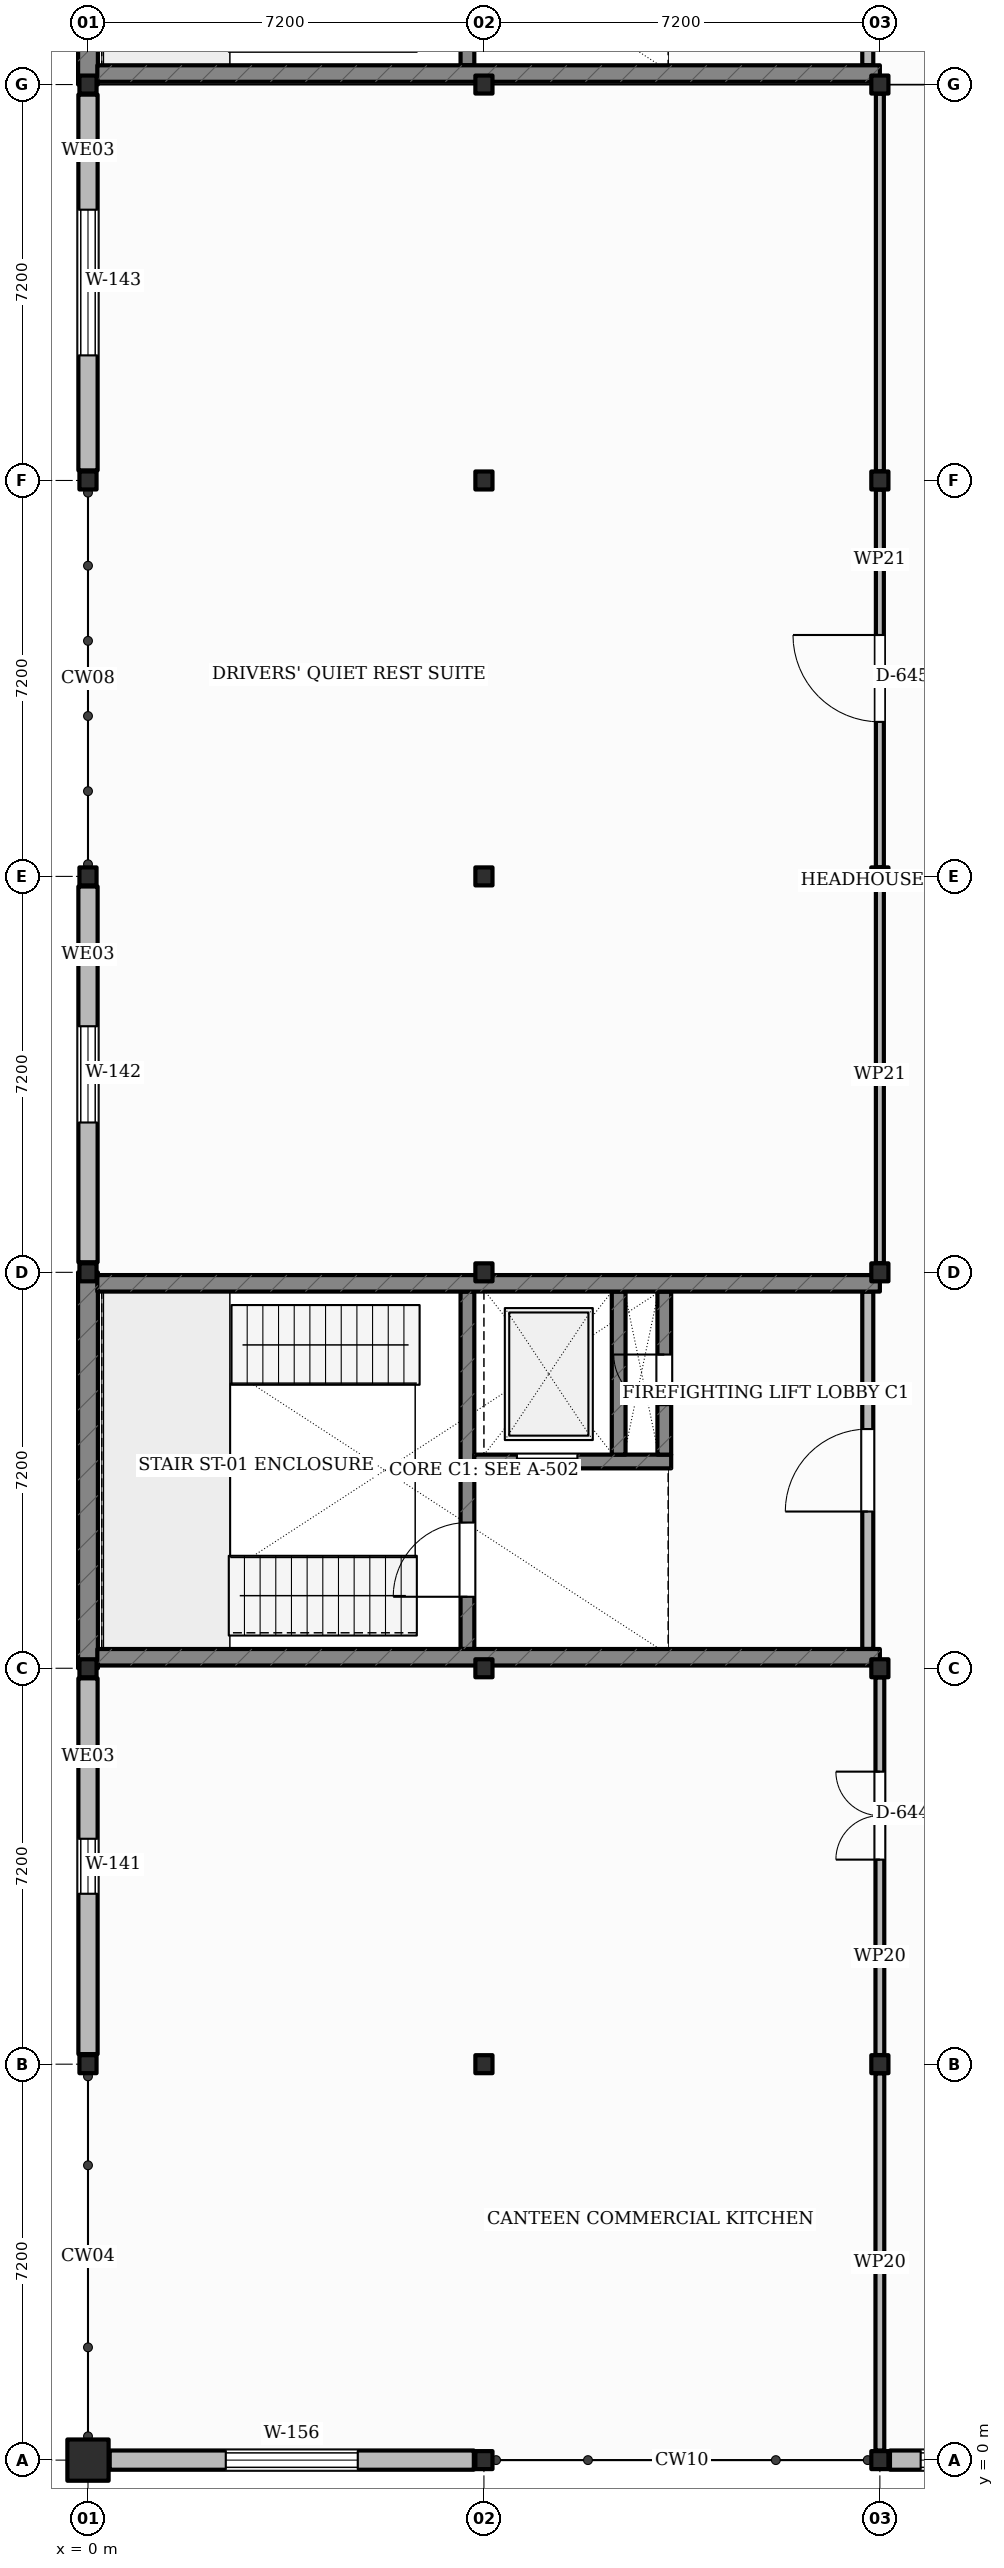
"""IFC4 building model, lengths in metres.
Left out: names, types, materials, properties, quantities, classifications, styles, units other than length and angle.
Written with IfcOpenShell. Run it as: python <this file> out.ifc"""

import sys

from ifc_helpers import new_model, si_unit, direction, frame, frame_2d, origin, origin_with_axes, origin_2d, place, context, subcontext, project, spatial, rectangle, i_section, extrude, element, fill, save


model = new_model("IFC4")
c1 = context("Model", 3, precision=1e-05, world=origin(), true_north=direction((0.0, 1.0)))
c2 = subcontext(c1, "Body", "Model", "MODEL_VIEW")
j1 = project(units=[si_unit("LENGTHUNIT", "METRE"), si_unit("PLANEANGLEUNIT", "RADIAN")], contexts=[c1])
p1 = place(None, origin())
s1 = spatial("IfcSite", under=j1, at=p1, CompositionType="ELEMENT")
p2 = place(p1, origin())
s2 = spatial("IfcBuilding", under=s1, at=p2, CompositionType="ELEMENT")
p3 = place(p2, frame((0.0, 0.0, 5.4)))
s3 = spatial("IfcBuildingStorey", under=s2, at=p3, CompositionType="ELEMENT", Elevation=5.4)
p4 = place(p3, origin_with_axes())
e1 = element("IfcColumn", 1, at=p4, inside=s3, PredefinedType="COLUMN", context=c2, shape_type="SweptSolid", body=[
    extrude(rectangle(XDim=0.75, YDim=0.75, at=origin_2d()), origin(), (0.0, 0.0, 1.0), 4.5),
])
for number, where, z_axis, x_axis in (
    (2, (0.0, 7.2, 0.0), (0.0, 0.0, 1.0), (1.0, 0.0, 0.0)),
    (3, (0.0, 14.4, 0.0), (0.0, 0.0, 1.0), (1.0, 0.0, 0.0)),
    (4, (0.0, 21.6, 0.0), (0.0, 0.0, 1.0), (1.0, 0.0, 0.0)),
    (5, (0.0, 28.8, 0.0), (0.0, 0.0, 1.0), (1.0, 0.0, 0.0)),
    (6, (0.0, 36.0, 0.0), (0.0, 0.0, 1.0), (1.0, 0.0, 0.0)),
    (7, (0.0, 43.2, 0.0), (0.0, 0.0, 1.0), (1.0, 0.0, 0.0)),
    (8, (7.2, 0.0, 0.0), (0.0, 0.0, 1.0), (1.0, 0.0, 0.0)),
    (9, (7.2, 7.2, 0.0), (0.0, 0.0, 1.0), (1.0, 0.0, 0.0)),
    (10, (7.2, 14.4, 0.0), (0.0, 0.0, 1.0), (1.0, 0.0, 0.0)),
    (11, (7.2, 21.6, 0.0), (0.0, 0.0, 1.0), (1.0, 0.0, 0.0)),
    (12, (7.2, 28.8, 0.0), (0.0, 0.0, 1.0), (1.0, 0.0, 0.0)),
    (13, (7.2, 36.0, 0.0), (0.0, 0.0, 1.0), (1.0, 0.0, 0.0)),
    (14, (7.2, 43.2, 0.0), (0.0, 0.0, 1.0), (1.0, 0.0, 0.0)),
    (15, (14.4, 0.0, 0.0), (0.0, 0.0, 1.0), (1.0, 0.0, 0.0)),
    (16, (14.4, 7.2, 0.0), (0.0, 0.0, 1.0), (1.0, 0.0, 0.0)),
    (17, (14.4, 14.4, 0.0), (0.0, 0.0, 1.0), (1.0, 0.0, 0.0)),
    (18, (14.4, 21.6, 0.0), (0.0, 0.0, 1.0), (1.0, 0.0, 0.0)),
    (19, (14.4, 28.8, 0.0), (0.0, 0.0, 1.0), (1.0, 0.0, 0.0)),
    (20, (14.4, 36.0, 0.0), (0.0, 0.0, 1.0), (1.0, 0.0, 0.0)),
    (21, (14.4, 43.2, 0.0), (0.0, 0.0, 1.0), (1.0, 0.0, 0.0)),
):
    element("IfcColumn", number, at=place(p3, frame(where, z_axis=z_axis, x_axis=x_axis)), inside=s3, PredefinedType="COLUMN", context=c2, shape_type="SweptSolid", body=[
        extrude(i_section(OverallWidth=0.311, OverallDepth=0.327, WebThickness=0.016, FlangeThickness=0.025, FilletRadius=0.015, at=origin_2d()), origin(), (0.0, 0.0, 1.0), 4.5),
    ])
p5 = place(p3, frame((0.0, 7.384, 0.0), z_axis=(0.0, 0.0, 1.0), x_axis=(0.0, 1.0, 0.0)))
e22 = element("IfcWall", 22, at=p5, inside=s3, PredefinedType="SOLIDWALL", context=c2, shape_type="SweptSolid", body=[
    extrude(rectangle(XDim=6.833, YDim=0.35, at=frame_2d((3.417, 0.0))), origin(), (0.0, 0.0, 1.0), 3.704),
])
p6 = place(p5, frame((2.916, 0.0, 1.05)))
e23 = element("IfcOpeningElement", 23, at=p6, cuts=e22, PredefinedType="OPENING", context=c2, shape_type="SweptSolid", body=[
    extrude(rectangle(XDim=1.0, YDim=1.6, at=frame_2d((0.5, 0.8))), frame((0.0, 0.185, 0.0), z_axis=(0.0, -1.0, 0.0), x_axis=(1.0, 0.0, 0.0)), (0.0, 0.0, 1.0), 0.37),
])
p7 = place(p3, frame((0.0, 14.4, 0.0), z_axis=(0.0, 0.0, 1.0), x_axis=(0.0, 1.0, 0.0)))
e24 = element("IfcWall", 24, at=p7, inside=s3, PredefinedType="SHEAR", context=c2, shape_type="SweptSolid", body=[
    extrude(rectangle(XDim=7.2, YDim=0.36, at=frame_2d((3.6, 0.0))), origin(), (0.0, 0.0, 1.0), 3.704),
])
p8 = place(p3, frame((0.0, 21.784, 0.0), z_axis=(0.0, 0.0, 1.0), x_axis=(0.0, 1.0, 0.0)))
e25 = element("IfcWall", 25, at=p8, inside=s3, PredefinedType="SOLIDWALL", context=c2, shape_type="SweptSolid", body=[
    extrude(rectangle(XDim=6.833, YDim=0.35, at=frame_2d((3.417, 0.0))), origin(), (0.0, 0.0, 1.0), 3.704),
])
p9 = place(p8, frame((2.541, 0.0, 1.05)))
e26 = element("IfcOpeningElement", 26, at=p9, cuts=e25, PredefinedType="OPENING", context=c2, shape_type="SweptSolid", body=[
    extrude(rectangle(XDim=1.75, YDim=1.85, at=frame_2d((0.875, 0.925))), frame((0.0, 0.185, 0.0), z_axis=(0.0, -1.0, 0.0), x_axis=(1.0, 0.0, 0.0)), (0.0, 0.0, 1.0), 0.37),
])
p10 = place(p3, frame((0.0, 36.184, 0.0), z_axis=(0.0, 0.0, 1.0), x_axis=(0.0, 1.0, 0.0)))
e27 = element("IfcWall", 27, at=p10, inside=s3, PredefinedType="SOLIDWALL", context=c2, shape_type="SweptSolid", body=[
    extrude(rectangle(XDim=6.833, YDim=0.35, at=frame_2d((3.417, 0.0))), origin(), (0.0, 0.0, 1.0), 3.704),
])
p11 = place(p10, frame((2.091, 0.0, 1.05)))
e28 = element("IfcOpeningElement", 28, at=p11, cuts=e27, PredefinedType="OPENING", context=c2, shape_type="SweptSolid", body=[
    extrude(rectangle(XDim=2.65, YDim=1.6, at=frame_2d((1.325, 0.8))), frame((0.0, 0.185, 0.0), z_axis=(0.0, -1.0, 0.0), x_axis=(1.0, 0.0, 0.0)), (0.0, 0.0, 1.0), 0.37),
])
p12 = place(p3, frame((0.0, 43.2, 0.0), z_axis=(0.0, 0.0, 1.0), x_axis=(0.0, 1.0, 0.0)))
e29 = element("IfcWall", 29, at=p12, inside=s3, PredefinedType="SHEAR", context=c2, shape_type="SweptSolid", body=[
    extrude(rectangle(XDim=7.2, YDim=0.36, at=frame_2d((3.6, 0.0))), origin(), (0.0, 0.0, 1.0), 3.704),
])
p13 = place(p3, frame((21.417, 0.0, 0.0), z_axis=(0.0, 0.0, 1.0), x_axis=(-1.0, 0.0, 0.0)))
e30 = element("IfcWall", 30, at=p13, inside=s3, PredefinedType="SOLIDWALL", context=c2, shape_type="SweptSolid", body=[
    extrude(rectangle(XDim=6.833, YDim=0.35, at=frame_2d((3.417, 0.0))), origin(), (0.0, 0.0, 1.0), 3.75),
])
p14 = place(p13, frame((3.625, 0.0, 1.05)))
e31 = element("IfcOpeningElement", 31, at=p14, cuts=e30, PredefinedType="OPENING", context=c2, shape_type="SweptSolid", body=[
    extrude(rectangle(XDim=2.65, YDim=1.6, at=frame_2d((1.325, 0.8))), frame((0.0, 0.185, 0.0), z_axis=(0.0, -1.0, 0.0), x_axis=(1.0, 0.0, 0.0)), (0.0, 0.0, 1.0), 0.37),
])
p15 = place(p3, frame((7.016, 0.0, 0.0), z_axis=(0.0, 0.0, 1.0), x_axis=(-1.0, 0.0, 0.0)))
e32 = element("IfcWall", 32, at=p15, inside=s3, PredefinedType="SOLIDWALL", context=c2, shape_type="SweptSolid", body=[
    extrude(rectangle(XDim=6.621, YDim=0.35, at=frame_2d((3.311, 0.0))), origin(), (0.0, 0.0, 1.0), 3.39),
])
p16 = place(p15, frame((2.111, 0.0, 1.05)))
e33 = element("IfcOpeningElement", 33, at=p16, cuts=e32, PredefinedType="OPENING", context=c2, shape_type="SweptSolid", body=[
    extrude(rectangle(XDim=2.4, YDim=1.8, at=frame_2d((1.2, 0.9))), frame((0.0, 0.185, 0.0), z_axis=(0.0, -1.0, 0.0), x_axis=(1.0, 0.0, 0.0)), (0.0, 0.0, 1.0), 0.37),
])
p17 = place(p3, frame((6.9, 14.75, 0.0), z_axis=(0.0, 0.0, 1.0), x_axis=(0.0, 1.0, 0.0)))
e34 = element("IfcWall", 34, at=p17, inside=s3, PredefinedType="SHEAR", context=c2, shape_type="SweptSolid", body=[
    extrude(rectangle(XDim=6.5, YDim=0.25, at=frame_2d((3.25, 0.0))), origin(), (0.0, 0.0, 1.0), 3.55),
])
p18 = place(p17, frame((0.95, 0.0, 0.0)))
e35 = element("IfcOpeningElement", 35, at=p18, cuts=e34, PredefinedType="OPENING", context=c2, shape_type="SweptSolid", body=[
    extrude(rectangle(XDim=1.35, YDim=2.15, at=frame_2d((0.675, 1.075))), frame((0.0, 0.135, 0.0), z_axis=(0.0, -1.0, 0.0), x_axis=(1.0, 0.0, 0.0)), (0.0, 0.0, 1.0), 0.27),
])
p19 = place(p3, frame((7.025, 18.16, 0.0), z_axis=(0.0, 0.0, 1.0), x_axis=(1.0, 0.0, 0.0)))
e36 = element("IfcWall", 36, at=p19, inside=s3, PredefinedType="SHEAR", context=c2, shape_type="SweptSolid", body=[
    extrude(rectangle(XDim=3.58, YDim=0.25, at=frame_2d((1.79, 0.0))), origin(), (0.0, 0.0, 1.0), 3.55),
])
p20 = place(p19, frame((0.775, 0.0, 0.0)))
e37 = element("IfcOpeningElement", 37, at=p20, cuts=e36, PredefinedType="OPENING", context=c2, shape_type="SweptSolid", body=[
    extrude(rectangle(XDim=1.1, YDim=2.15, at=frame_2d((0.55, 1.075))), frame((0.0, 0.135, 0.0), z_axis=(0.0, -1.0, 0.0), x_axis=(1.0, 0.0, 0.0)), (0.0, 0.0, 1.0), 0.27),
])
p21 = place(p3, frame((9.65, 18.285, 0.0), z_axis=(0.0, 0.0, 1.0), x_axis=(0.0, 1.0, 0.0)))
e38 = element("IfcWall", 38, at=p21, inside=s3, PredefinedType="SHEAR", context=c2, shape_type="SweptSolid", body=[
    extrude(rectangle(XDim=2.965, YDim=0.25, at=frame_2d((1.482, 0.0))), origin(), (0.0, 0.0, 1.0), 3.55),
])
p22 = place(p3, frame((10.48, 18.285, 0.0), z_axis=(0.0, 0.0, 1.0), x_axis=(0.0, 1.0, 0.0)))
e39 = element("IfcWall", 39, at=p22, inside=s3, PredefinedType="SHEAR", context=c2, shape_type="SweptSolid", body=[
    extrude(rectangle(XDim=2.965, YDim=0.25, at=frame_2d((1.482, 0.0))), origin(), (0.0, 0.0, 1.0), 3.55),
])
p23 = place(p22, frame((0.9, 0.0, 0.0)))
e40 = element("IfcOpeningElement", 40, at=p23, cuts=e39, PredefinedType="OPENING", context=c2, shape_type="SweptSolid", body=[
    extrude(rectangle(XDim=0.92, YDim=2.05, at=frame_2d((0.46, 1.025))), frame((0.0, 0.135, 0.0), z_axis=(0.0, -1.0, 0.0), x_axis=(1.0, 0.0, 0.0)), (0.0, 0.0, 1.0), 0.27),
])
p24 = place(p3, frame((14.18, 14.75, 0.0), z_axis=(0.0, 0.0, 1.0), x_axis=(0.0, 1.0, 0.0)))
e41 = element("IfcWall", 41, at=p24, inside=s3, PredefinedType="SOLIDWALL", context=c2, shape_type="SweptSolid", body=[
    extrude(rectangle(XDim=6.5, YDim=0.2, at=frame_2d((3.25, 0.0))), origin(), (0.0, 0.0, 1.0), 3.55),
])
p25 = place(p24, frame((2.5, 0.0, 0.0)))
e42 = element("IfcOpeningElement", 42, at=p25, cuts=e41, PredefinedType="OPENING", context=c2, shape_type="SweptSolid", body=[
    extrude(rectangle(XDim=1.5, YDim=2.15, at=frame_2d((0.75, 1.075))), frame((0.0, 0.11, 0.0), z_axis=(0.0, -1.0, 0.0), x_axis=(1.0, 0.0, 0.0)), (0.0, 0.0, 1.0), 0.22),
])
for number, where, z_axis, x_axis in (
    (43, (0.17, 14.6, 0.0), (0.0, 0.0, 1.0), (1.0, 0.0, 0.0)),
    (44, (0.17, 21.4, 0.0), (0.0, 0.0, 1.0), (1.0, 0.0, 0.0)),
):
    element("IfcWall", number, at=place(p3, frame(where, z_axis=z_axis, x_axis=x_axis)), inside=s3, PredefinedType="SHEAR", context=c2, shape_type="SweptSolid", body=[
        extrude(rectangle(XDim=14.23, YDim=0.3, at=frame_2d((7.115, 0.0))), origin(), (0.0, 0.0, 1.0), 3.55),
    ])
p26 = place(p3, frame((6.9, 43.55, 0.0), z_axis=(0.0, 0.0, 1.0), x_axis=(0.0, 1.0, 0.0)))
e45 = element("IfcWall", 45, at=p26, inside=s3, PredefinedType="SHEAR", context=c2, shape_type="SweptSolid", body=[
    extrude(rectangle(XDim=6.5, YDim=0.25, at=frame_2d((3.25, 0.0))), origin(), (0.0, 0.0, 1.0), 3.55),
])
p27 = place(p26, frame((0.95, 0.0, 0.0)))
e46 = element("IfcOpeningElement", 46, at=p27, cuts=e45, PredefinedType="OPENING", context=c2, shape_type="SweptSolid", body=[
    extrude(rectangle(XDim=1.35, YDim=2.15, at=frame_2d((0.675, 1.075))), frame((0.0, 0.135, 0.0), z_axis=(0.0, -1.0, 0.0), x_axis=(1.0, 0.0, 0.0)), (0.0, 0.0, 1.0), 0.27),
])
p28 = place(p3, frame((14.18, 43.55, 0.0), z_axis=(0.0, 0.0, 1.0), x_axis=(0.0, 1.0, 0.0)))
e47 = element("IfcWall", 47, at=p28, inside=s3, PredefinedType="SOLIDWALL", context=c2, shape_type="SweptSolid", body=[
    extrude(rectangle(XDim=6.5, YDim=0.2, at=frame_2d((3.25, 0.0))), origin(), (0.0, 0.0, 1.0), 3.55),
])
p29 = place(p28, frame((2.5, 0.0, 0.0)))
e48 = element("IfcOpeningElement", 48, at=p29, cuts=e47, PredefinedType="OPENING", context=c2, shape_type="SweptSolid", body=[
    extrude(rectangle(XDim=1.5, YDim=2.15, at=frame_2d((0.75, 1.075))), frame((0.0, 0.11, 0.0), z_axis=(0.0, -1.0, 0.0), x_axis=(1.0, 0.0, 0.0)), (0.0, 0.0, 1.0), 0.22),
])
p30 = place(p3, frame((0.17, 43.4, 0.0), z_axis=(0.0, 0.0, 1.0), x_axis=(1.0, 0.0, 0.0)))
e49 = element("IfcWall", 49, at=p30, inside=s3, PredefinedType="SHEAR", context=c2, shape_type="SweptSolid", body=[
    extrude(rectangle(XDim=14.23, YDim=0.3, at=frame_2d((7.115, 0.0))), origin(), (0.0, 0.0, 1.0), 3.55),
])
p31 = place(p3, frame((14.4, 0.175, 0.0), z_axis=(0.0, 0.0, 1.0), x_axis=(0.0, 1.0, 0.0)))
e50 = element("IfcWall", 50, at=p31, inside=s3, PredefinedType="PARTITIONING", context=c2, shape_type="SweptSolid", body=[
    extrude(rectangle(XDim=6.859, YDim=0.16, at=frame_2d((3.429, 0.0))), origin(), (0.0, 0.0, 1.0), 3.55),
])
p32 = place(p3, frame((14.4, 7.366, 0.0), z_axis=(0.0, 0.0, 1.0), x_axis=(0.0, 1.0, 0.0)))
e51 = element("IfcWall", 51, at=p32, inside=s3, PredefinedType="PARTITIONING", context=c2, shape_type="SweptSolid", body=[
    extrude(rectangle(XDim=6.868, YDim=0.16, at=frame_2d((3.434, 0.0))), origin(), (0.0, 0.0, 1.0), 3.55),
])
p33 = place(p32, frame((3.554, 0.0, 0.0)))
e52 = element("IfcOpeningElement", 52, at=p33, cuts=e51, PredefinedType="OPENING", context=c2, shape_type="SweptSolid", body=[
    extrude(rectangle(XDim=1.6, YDim=2.2, at=frame_2d((0.8, 1.1))), frame((0.0, 0.09, 0.0), z_axis=(0.0, -1.0, 0.0), x_axis=(1.0, 0.0, 0.0)), (0.0, 0.0, 1.0), 0.18),
])
p34 = place(p3, frame((14.4, 21.766, 0.0), z_axis=(0.0, 0.0, 1.0), x_axis=(0.0, 1.0, 0.0)))
e53 = element("IfcWall", 53, at=p34, inside=s3, PredefinedType="PARTITIONING", context=c2, shape_type="SweptSolid", body=[
    extrude(rectangle(XDim=6.868, YDim=0.145, at=frame_2d((3.434, 0.0))), origin(), (0.0, 0.0, 1.0), 3.55),
])
p35 = place(p3, frame((14.4, 28.966, 0.0), z_axis=(0.0, 0.0, 1.0), x_axis=(0.0, 1.0, 0.0)))
e54 = element("IfcWall", 54, at=p35, inside=s3, PredefinedType="PARTITIONING", context=c2, shape_type="SweptSolid", body=[
    extrude(rectangle(XDim=6.868, YDim=0.145, at=frame_2d((3.434, 0.0))), origin(), (0.0, 0.0, 1.0), 3.55),
])
p36 = place(p35, frame((2.644, 0.0, 0.0)))
e55 = element("IfcOpeningElement", 55, at=p36, cuts=e54, PredefinedType="OPENING", context=c2, shape_type="SweptSolid", body=[
    extrude(rectangle(XDim=1.58, YDim=2.08, at=frame_2d((0.79, 1.04))), frame((0.0, 0.083, 0.0), z_axis=(0.0, -1.0, 0.0), x_axis=(1.0, 0.0, 0.0)), (0.0, 0.0, 1.0), 0.165),
])
p37 = place(p3, frame((14.4, 36.166, 0.0), z_axis=(0.0, 0.0, 1.0), x_axis=(0.0, 1.0, 0.0)))
e56 = element("IfcWall", 56, at=p37, inside=s3, PredefinedType="PARTITIONING", context=c2, shape_type="SweptSolid", body=[
    extrude(rectangle(XDim=6.868, YDim=0.145, at=frame_2d((3.434, 0.0))), origin(), (0.0, 0.0, 1.0), 3.55),
])
p38 = place(p6, origin())
e57 = element("IfcWindow", 57, at=p38, inside=s3, PartitioningType="SINGLE_PANEL", PredefinedType="WINDOW", context=c2, shape_type="SweptSolid", body=[
    extrude(rectangle(XDim=1.0, YDim=1.6, at=frame_2d((0.5, 0.8))), frame((0.0, 0.03, 0.0), z_axis=(0.0, -1.0, 0.0), x_axis=(1.0, 0.0, 0.0)), (0.0, 0.0, 1.0), 0.06),
])
fill(e23, e57)
p39 = place(p9, origin())
e58 = element("IfcWindow", 58, at=p39, inside=s3, PartitioningType="SINGLE_PANEL", PredefinedType="WINDOW", context=c2, shape_type="SweptSolid", body=[
    extrude(rectangle(XDim=1.75, YDim=1.85, at=frame_2d((0.875, 0.925))), frame((0.0, 0.03, 0.0), z_axis=(0.0, -1.0, 0.0), x_axis=(1.0, 0.0, 0.0)), (0.0, 0.0, 1.0), 0.06),
])
fill(e26, e58)
p40 = place(p11, origin())
e59 = element("IfcWindow", 59, at=p40, inside=s3, PartitioningType="SINGLE_PANEL", PredefinedType="WINDOW", context=c2, shape_type="SweptSolid", body=[
    extrude(rectangle(XDim=2.65, YDim=1.6, at=frame_2d((1.325, 0.8))), frame((0.0, 0.03, 0.0), z_axis=(0.0, -1.0, 0.0), x_axis=(1.0, 0.0, 0.0)), (0.0, 0.0, 1.0), 0.06),
])
fill(e28, e59)
p41 = place(p14, origin())
e60 = element("IfcWindow", 60, at=p41, inside=s3, PartitioningType="SINGLE_PANEL", PredefinedType="WINDOW", context=c2, shape_type="SweptSolid", body=[
    extrude(rectangle(XDim=2.65, YDim=1.6, at=frame_2d((1.325, 0.8))), frame((0.0, 0.03, 0.0), z_axis=(0.0, -1.0, 0.0), x_axis=(1.0, 0.0, 0.0)), (0.0, 0.0, 1.0), 0.06),
])
fill(e31, e60)
p42 = place(p16, origin())
e61 = element("IfcWindow", 61, at=p42, inside=s3, PartitioningType="SINGLE_PANEL", PredefinedType="WINDOW", context=c2, shape_type="SweptSolid", body=[
    extrude(rectangle(XDim=2.4, YDim=1.8, at=frame_2d((1.2, 0.9))), frame((0.0, 0.03, 0.0), z_axis=(0.0, -1.0, 0.0), x_axis=(1.0, 0.0, 0.0)), (0.0, 0.0, 1.0), 0.06),
])
fill(e33, e61)
p43 = place(p18, origin())
e62 = element("IfcDoor", 62, at=p43, inside=s3, OperationType="SINGLE_SWING_LEFT", PredefinedType="DOOR", context=c2, shape_type="SweptSolid", body=[
    extrude(rectangle(XDim=1.35, YDim=2.15, at=frame_2d((0.675, 1.075))), frame((0.0, 0.025, 0.0), z_axis=(0.0, -1.0, 0.0), x_axis=(1.0, 0.0, 0.0)), (0.0, 0.0, 1.0), 0.05),
])
fill(e35, e62)
p44 = place(p20, origin())
e63 = element("IfcDoor", 63, at=p44, inside=s3, OperationType="SLIDING_TO_LEFT", PredefinedType="DOOR", context=c2, shape_type="SweptSolid", body=[
    extrude(rectangle(XDim=1.1, YDim=2.15, at=frame_2d((0.55, 1.075))), frame((0.0, 0.025, 0.0), z_axis=(0.0, -1.0, 0.0), x_axis=(1.0, 0.0, 0.0)), (0.0, 0.0, 1.0), 0.05),
])
fill(e37, e63)
p45 = place(p23, origin())
e64 = element("IfcDoor", 64, at=p45, inside=s3, OperationType="SINGLE_SWING_RIGHT", PredefinedType="DOOR", context=c2, shape_type="SweptSolid", body=[
    extrude(rectangle(XDim=0.92, YDim=2.05, at=frame_2d((0.46, 1.025))), frame((0.0, 0.025, 0.0), z_axis=(0.0, -1.0, 0.0), x_axis=(1.0, 0.0, 0.0)), (0.0, 0.0, 1.0), 0.05),
])
fill(e40, e64)
p46 = place(p25, origin())
e65 = element("IfcDoor", 65, at=p46, inside=s3, OperationType="SINGLE_SWING_LEFT", PredefinedType="DOOR", context=c2, shape_type="SweptSolid", body=[
    extrude(rectangle(XDim=1.5, YDim=2.15, at=frame_2d((0.75, 1.075))), frame((0.0, 0.025, 0.0), z_axis=(0.0, -1.0, 0.0), x_axis=(1.0, 0.0, 0.0)), (0.0, 0.0, 1.0), 0.05),
])
fill(e42, e65)
p47 = place(p33, origin())
e66 = element("IfcDoor", 66, at=p47, inside=s3, OperationType="DOUBLE_SWING_LEFT", PredefinedType="DOOR", context=c2, shape_type="SweptSolid", body=[
    extrude(rectangle(XDim=1.6, YDim=2.2, at=frame_2d((0.8, 1.1))), frame((0.0, 0.025, 0.0), z_axis=(0.0, -1.0, 0.0), x_axis=(1.0, 0.0, 0.0)), (0.0, 0.0, 1.0), 0.05),
])
fill(e52, e66)
p48 = place(p36, origin())
e67 = element("IfcDoor", 67, at=p48, inside=s3, OperationType="SINGLE_SWING_RIGHT", PredefinedType="DOOR", context=c2, shape_type="SweptSolid", body=[
    extrude(rectangle(XDim=1.58, YDim=2.08, at=frame_2d((0.79, 1.04))), frame((0.0, 0.025, 0.0), z_axis=(0.0, -1.0, 0.0), x_axis=(1.0, 0.0, 0.0)), (0.0, 0.0, 1.0), 0.05),
])
fill(e55, e67)
save(model, sys.argv[1])
